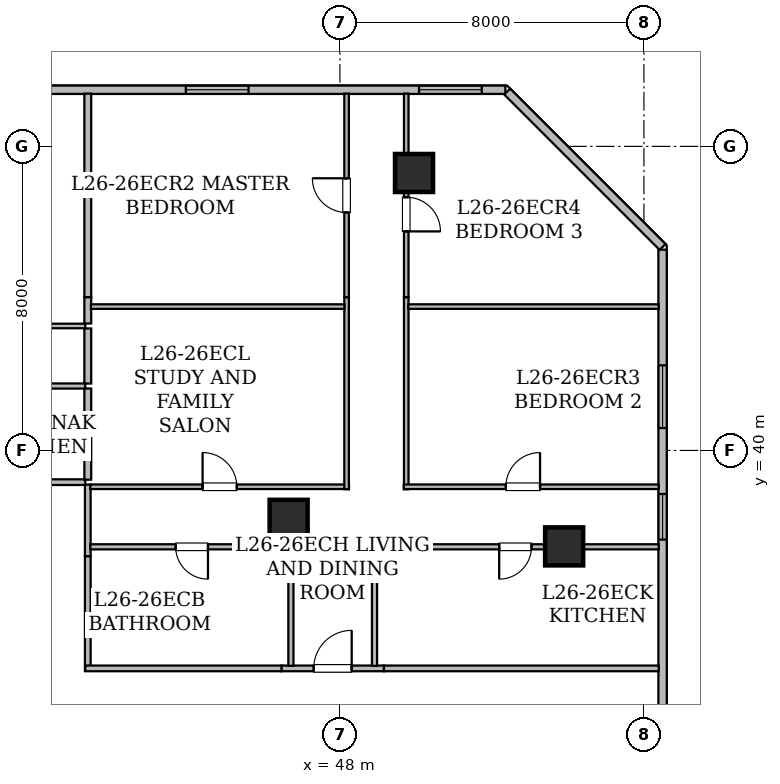
"""IFC4 building model, lengths in metres.
Left out: names, types, materials, properties, quantities, classifications, styles, units other than length and angle.
Written with IfcOpenShell. Run it as: python <this file> out.ifc"""

import sys

from ifc_helpers import new_model, si_unit, direction, frame, frame_2d, origin, origin_2d, place, context, subcontext, project, spatial, rectangle, hollow_rectangle, extrude, element, fill, save


model = new_model("IFC4")
c1 = context("Model", 3, precision=1e-05, world=origin(), true_north=direction((0.0, 1.0)))
c2 = subcontext(c1, "Body", "Model", "MODEL_VIEW")
j1 = project(units=[si_unit("LENGTHUNIT", "METRE"), si_unit("PLANEANGLEUNIT", "RADIAN")], contexts=[c1])
p1 = place(None, origin())
s1 = spatial("IfcSite", under=j1, at=p1, CompositionType="ELEMENT")
p2 = place(p1, origin())
s2 = spatial("IfcBuilding", under=s1, at=p2, CompositionType="ELEMENT")
p3 = place(p2, frame((0.0, 0.0, 105.55)))
s3 = spatial("IfcBuildingStorey", under=s2, at=p3, CompositionType="ELEMENT", Elevation=105.55)
for number, where, z_axis, x_axis in (
    (1, (49.95, 47.3, 0.0), (0.0, 0.0, 1.0), (1.0, 0.0, 0.0)),
    (2, (53.9, 37.475, 0.0), (0.0, 0.0, 1.0), (1.0, 0.0, 0.0)),
    (3, (46.65, 38.2, 0.0), (0.0, 0.0, 1.0), (1.0, 0.0, 0.0)),
):
    element("IfcColumn", number, at=place(p3, frame(where, z_axis=z_axis, x_axis=x_axis)), inside=s3, PredefinedType="COLUMN", context=c2, shape_type="SweptSolid", body=[
        extrude(hollow_rectangle(XDim=1.0, YDim=1.0, WallThickness=0.05, at=origin_2d()), origin(), (0.0, 0.0, 1.0), 3.65),
    ])
p4 = place(p3, frame((13.715, 49.49, 0.0), z_axis=(0.0, 0.0, 1.0), x_axis=(1.0, 0.0, 0.0)))
e4 = element("IfcWall", 4, at=p4, inside=s3, PredefinedType="STANDARD", context=c2, shape_type="SweptSolid", body=[
    extrude(rectangle(XDim=38.639, YDim=0.22, at=frame_2d((19.319, 0.0))), origin(), (0.0, 0.0, 1.0), 3.43),
])
p5 = place(p4, frame((1.435, 0.0, 0.85)))
e5 = element("IfcOpeningElement", 5, at=p5, cuts=e4, PredefinedType="OPENING", context=c2, shape_type="SweptSolid", body=[
    extrude(rectangle(XDim=1.65, YDim=1.55, at=frame_2d((0.825, 0.775))), frame((0.0, 0.12, 0.0), z_axis=(0.0, -1.0, 0.0), x_axis=(1.0, 0.0, 0.0)), (0.0, 0.0, 1.0), 0.24),
])
p6 = place(p4, frame((10.802, 0.0, 0.85)))
e6 = element("IfcOpeningElement", 6, at=p6, cuts=e4, PredefinedType="OPENING", context=c2, shape_type="SweptSolid", body=[
    extrude(rectangle(XDim=1.65, YDim=1.55, at=frame_2d((0.825, 0.775))), frame((0.0, 0.12, 0.0), z_axis=(0.0, -1.0, 0.0), x_axis=(1.0, 0.0, 0.0)), (0.0, 0.0, 1.0), 0.24),
])
p7 = place(p4, frame((8.744, 0.0, 0.8)))
e7 = element("IfcOpeningElement", 7, at=p7, cuts=e4, PredefinedType="OPENING", context=c2, shape_type="SweptSolid", body=[
    extrude(rectangle(XDim=1.2, YDim=1.5, at=frame_2d((0.6, 0.75))), frame((0.0, 0.12, 0.0), z_axis=(0.0, -1.0, 0.0), x_axis=(1.0, 0.0, 0.0)), (0.0, 0.0, 1.0), 0.24),
])
p8 = place(p4, frame((5.319, 0.0, 0.85)))
e8 = element("IfcOpeningElement", 8, at=p8, cuts=e4, PredefinedType="OPENING", context=c2, shape_type="SweptSolid", body=[
    extrude(rectangle(XDim=1.65, YDim=1.55, at=frame_2d((0.825, 0.775))), frame((0.0, 0.12, 0.0), z_axis=(0.0, -1.0, 0.0), x_axis=(1.0, 0.0, 0.0)), (0.0, 0.0, 1.0), 0.24),
])
p9 = place(p4, frame((15.665, 0.0, 0.85)))
e9 = element("IfcOpeningElement", 9, at=p9, cuts=e4, PredefinedType="OPENING", context=c2, shape_type="SweptSolid", body=[
    extrude(rectangle(XDim=1.65, YDim=1.55, at=frame_2d((0.825, 0.775))), frame((0.0, 0.12, 0.0), z_axis=(0.0, -1.0, 0.0), x_axis=(1.0, 0.0, 0.0)), (0.0, 0.0, 1.0), 0.24),
])
p10 = place(p4, frame((22.93, 0.0, 0.85)))
e10 = element("IfcOpeningElement", 10, at=p10, cuts=e4, PredefinedType="OPENING", context=c2, shape_type="SweptSolid", body=[
    extrude(rectangle(XDim=1.65, YDim=1.55, at=frame_2d((0.825, 0.775))), frame((0.0, 0.12, 0.0), z_axis=(0.0, -1.0, 0.0), x_axis=(1.0, 0.0, 0.0)), (0.0, 0.0, 1.0), 0.24),
])
p11 = place(p4, frame((30.23, 0.0, 0.85)))
e11 = element("IfcOpeningElement", 11, at=p11, cuts=e4, PredefinedType="OPENING", context=c2, shape_type="SweptSolid", body=[
    extrude(rectangle(XDim=1.65, YDim=1.55, at=frame_2d((0.825, 0.775))), frame((0.0, 0.12, 0.0), z_axis=(0.0, -1.0, 0.0), x_axis=(1.0, 0.0, 0.0)), (0.0, 0.0, 1.0), 0.24),
])
p12 = place(p4, frame((36.367, 0.0, 0.85)))
e12 = element("IfcOpeningElement", 12, at=p12, cuts=e4, PredefinedType="OPENING", context=c2, shape_type="SweptSolid", body=[
    extrude(rectangle(XDim=1.65, YDim=1.55, at=frame_2d((0.825, 0.775))), frame((0.0, 0.12, 0.0), z_axis=(0.0, -1.0, 0.0), x_axis=(1.0, 0.0, 0.0)), (0.0, 0.0, 1.0), 0.24),
])
p13 = place(p3, frame((52.402, 49.442, 0.0), z_axis=(0.0, 0.0, 1.0), x_axis=(0.707106781187, -0.707106781187, 0.0)))
e13 = element("IfcWall", 13, at=p13, inside=s3, PredefinedType="STANDARD", context=c2, shape_type="SweptSolid", body=[
    extrude(rectangle(XDim=5.781, YDim=0.22, at=frame_2d((2.891, 0.0))), origin(), (0.0, 0.0, 1.0), 3.43),
])
p14 = place(p3, frame((56.49, 45.283, 0.0), z_axis=(0.0, 0.0, 1.0), x_axis=(0.0, -1.0, 0.0)))
e14 = element("IfcWall", 14, at=p14, inside=s3, PredefinedType="STANDARD", context=c2, shape_type="SweptSolid", body=[
    extrude(rectangle(XDim=14.046, YDim=0.22, at=frame_2d((7.023, 0.0))), origin(), (0.0, 0.0, 1.0), 3.43),
])
p15 = place(p14, frame((6.429, 0.0, 0.8)))
e15 = element("IfcOpeningElement", 15, at=p15, cuts=e14, PredefinedType="OPENING", context=c2, shape_type="SweptSolid", body=[
    extrude(rectangle(XDim=1.2, YDim=1.5, at=frame_2d((0.6, 0.75))), frame((0.0, 0.12, 0.0), z_axis=(0.0, -1.0, 0.0), x_axis=(1.0, 0.0, 0.0)), (0.0, 0.0, 1.0), 0.24),
])
p16 = place(p14, frame((3.044, 0.0, 0.85)))
e16 = element("IfcOpeningElement", 16, at=p16, cuts=e14, PredefinedType="OPENING", context=c2, shape_type="SweptSolid", body=[
    extrude(rectangle(XDim=1.65, YDim=1.55, at=frame_2d((0.825, 0.775))), frame((0.0, 0.12, 0.0), z_axis=(0.0, -1.0, 0.0), x_axis=(1.0, 0.0, 0.0)), (0.0, 0.0, 1.0), 0.24),
])
p17 = place(p3, frame((34.299, 39.165, 0.0), z_axis=(0.0, 0.0, 1.0), x_axis=(1.0, 0.0, 0.0)))
e17 = element("IfcWall", 17, at=p17, inside=s3, PredefinedType="STANDARD", context=c2, shape_type="SweptSolid", body=[
    extrude(rectangle(XDim=7.001, YDim=0.15, at=frame_2d((3.5, 0.0))), origin(), (0.0, 0.0, 1.0), 2.647),
])
p18 = place(p3, frame((41.365, 39.1, 0.0), z_axis=(0.0, 0.0, 1.0), x_axis=(0.0, -1.0, 0.0)))
e18 = element("IfcWall", 18, at=p18, inside=s3, PredefinedType="STANDARD", context=c2, shape_type="SweptSolid", body=[
    extrude(rectangle(XDim=1.885, YDim=0.15, at=frame_2d((0.942, 0.0))), origin(), (0.0, 0.0, 1.0), 2.647),
])
p19 = place(p3, frame((46.461, 34.265, 0.0), z_axis=(0.0, 0.0, 1.0), x_axis=(1.0, 0.0, 0.0)))
e19 = element("IfcWall", 19, at=p19, inside=s3, PredefinedType="STANDARD", context=c2, shape_type="SweptSolid", body=[
    extrude(rectangle(XDim=2.698, YDim=0.15, at=frame_2d((1.349, 0.0))), origin(), (0.0, 0.0, 1.0), 2.647),
])
p20 = place(p19, frame((0.849, 0.0, 0.0)))
e20 = element("IfcOpeningElement", 20, at=p20, cuts=e19, PredefinedType="OPENING", context=c2, shape_type="SweptSolid", body=[
    extrude(rectangle(XDim=1.0, YDim=2.15, at=frame_2d((0.5, 1.075))), frame((0.0, 0.085, 0.0), z_axis=(0.0, -1.0, 0.0), x_axis=(1.0, 0.0, 0.0)), (0.0, 0.0, 1.0), 0.17),
])
p21 = place(p3, frame((41.365, 37.215, 0.0), z_axis=(0.0, 0.0, 1.0), x_axis=(0.0, -1.0, 0.0)))
e21 = element("IfcWall", 21, at=p21, inside=s3, PredefinedType="STANDARD", context=c2, shape_type="SweptSolid", body=[
    extrude(rectangle(XDim=3.015, YDim=0.15, at=frame_2d((1.508, 0.0))), origin(), (0.0, 0.0, 1.0), 2.647),
])
p22 = place(p3, frame((41.3, 34.265, 0.0), z_axis=(0.0, 0.0, 1.0), x_axis=(1.0, 0.0, 0.0)))
e22 = element("IfcWall", 22, at=p22, inside=s3, PredefinedType="STANDARD", context=c2, shape_type="SweptSolid", body=[
    extrude(rectangle(XDim=5.161, YDim=0.15, at=frame_2d((2.581, 0.0))), origin(), (0.0, 0.0, 1.0), 2.647),
])
p23 = place(p3, frame((49.159, 34.265, 0.0), z_axis=(0.0, 0.0, 1.0), x_axis=(1.0, 0.0, 0.0)))
e23 = element("IfcWall", 23, at=p23, inside=s3, PredefinedType="STANDARD", context=c2, shape_type="SweptSolid", body=[
    extrude(rectangle(XDim=7.229, YDim=0.15, at=frame_2d((3.615, 0.0))), origin(), (0.0, 0.0, 1.0), 2.876),
])
p24 = place(p3, frame((41.3, 41.695, 0.0), z_axis=(0.0, 0.0, 1.0), x_axis=(-1.0, 0.0, 0.0)))
e24 = element("IfcWall", 24, at=p24, inside=s3, PredefinedType="PARTITIONING", context=c2, shape_type="SweptSolid", body=[
    extrude(rectangle(XDim=7.315, YDim=0.135, at=frame_2d((3.657, 0.0))), origin(), (0.0, 0.0, 1.0), 2.647),
])
p25 = place(p24, frame((3.233, 0.0, 0.0)))
e25 = element("IfcOpeningElement", 25, at=p25, cuts=e24, PredefinedType="OPENING", context=c2, shape_type="SweptSolid", body=[
    extrude(rectangle(XDim=0.85, YDim=2.1, at=frame_2d((0.425, 1.05))), frame((0.0, 0.077, 0.0), z_axis=(0.0, -1.0, 0.0), x_axis=(1.0, 0.0, 0.0)), (0.0, 0.0, 1.0), 0.155),
])
p26 = place(p3, frame((33.823, 43.275, 0.0), z_axis=(0.0, 0.0, 1.0), x_axis=(1.0, 0.0, 0.0)))
e26 = element("IfcWall", 26, at=p26, inside=s3, PredefinedType="PARTITIONING", context=c2, shape_type="SweptSolid", body=[
    extrude(rectangle(XDim=7.477, YDim=0.12, at=frame_2d((3.739, 0.0))), origin(), (0.0, 0.0, 1.0), 2.647),
])
p27 = place(p26, frame((3.288, 0.0, 0.0)))
e27 = element("IfcOpeningElement", 27, at=p27, cuts=e26, PredefinedType="OPENING", context=c2, shape_type="SweptSolid", body=[
    extrude(rectangle(XDim=0.9, YDim=2.1, at=frame_2d((0.45, 1.05))), frame((0.0, 0.07, 0.0), z_axis=(0.0, -1.0, 0.0), x_axis=(1.0, 0.0, 0.0)), (0.0, 0.0, 1.0), 0.14),
])
p28 = place(p3, frame((41.365, 43.21, 0.0), z_axis=(0.0, 0.0, 1.0), x_axis=(0.0, -1.0, 0.0)))
e28 = element("IfcWall", 28, at=p28, inside=s3, PredefinedType="STANDARD", context=c2, shape_type="SweptSolid", body=[
    extrude(rectangle(XDim=1.45, YDim=0.18, at=frame_2d((0.725, 0.0))), origin(), (0.0, 0.0, 1.0), 3.43),
])
p29 = place(p3, frame((41.365, 41.63, 0.0), z_axis=(0.0, 0.0, 1.0), x_axis=(0.0, -1.0, 0.0)))
e29 = element("IfcWall", 29, at=p29, inside=s3, PredefinedType="STANDARD", context=c2, shape_type="SweptSolid", body=[
    extrude(rectangle(XDim=2.4, YDim=0.18, at=frame_2d((1.2, 0.0))), origin(), (0.0, 0.0, 1.0), 3.43),
])
p30 = place(p3, frame((41.365, 44.034, 0.0), z_axis=(0.0, 0.0, 1.0), x_axis=(0.0, -1.0, 0.0)))
e30 = element("IfcWall", 30, at=p30, inside=s3, PredefinedType="STANDARD", context=c2, shape_type="SweptSolid", body=[
    extrude(rectangle(XDim=0.694, YDim=0.18, at=frame_2d((0.347, 0.0))), origin(), (0.0, 0.0, 1.0), 3.43),
])
p31 = place(p3, frame((41.365, 49.388, 0.0), z_axis=(0.0, 0.0, 1.0), x_axis=(0.0, -1.0, 0.0)))
e31 = element("IfcWall", 31, at=p31, inside=s3, PredefinedType="STANDARD", context=c2, shape_type="SweptSolid", body=[
    extrude(rectangle(XDim=5.354, YDim=0.18, at=frame_2d((2.677, 0.0))), origin(), (0.0, 0.0, 1.0), 2.876),
])
p32 = place(p3, frame((46.71, 34.332, 0.0), z_axis=(0.0, 0.0, 1.0), x_axis=(0.0, 1.0, 0.0)))
e32 = element("IfcWall", 32, at=p32, inside=s3, PredefinedType="PARTITIONING", context=c2, shape_type="SweptSolid", body=[
    extrude(rectangle(XDim=3.197, YDim=0.135, at=frame_2d((1.599, 0.0))), origin(), (0.0, 0.0, 1.0), 2.647),
])
p33 = place(p3, frame((46.775, 37.464, 0.0), z_axis=(0.0, 0.0, 1.0), x_axis=(-1.0, 0.0, 0.0)))
e33 = element("IfcWall", 33, at=p33, inside=s3, PredefinedType="PARTITIONING", context=c2, shape_type="SweptSolid", body=[
    extrude(rectangle(XDim=5.343, YDim=0.135, at=frame_2d((2.671, 0.0))), origin(), (0.0, 0.0, 1.0), 2.647),
])
p34 = place(p33, frame((2.247, 0.0, 0.0)))
e34 = element("IfcOpeningElement", 34, at=p34, cuts=e33, PredefinedType="OPENING", context=c2, shape_type="SweptSolid", body=[
    extrude(rectangle(XDim=0.85, YDim=2.1, at=frame_2d((0.425, 1.05))), frame((0.0, 0.077, 0.0), z_axis=(0.0, -1.0, 0.0), x_axis=(1.0, 0.0, 0.0)), (0.0, 0.0, 1.0), 0.155),
])
p35 = place(p3, frame((56.388, 37.464, 0.0), z_axis=(0.0, 0.0, 1.0), x_axis=(-1.0, 0.0, 0.0)))
e35 = element("IfcWall", 35, at=p35, inside=s3, PredefinedType="PARTITIONING", context=c2, shape_type="SweptSolid", body=[
    extrude(rectangle(XDim=7.543, YDim=0.135, at=frame_2d((3.771, 0.0))), origin(), (0.0, 0.0, 1.0), 2.647),
])
p36 = place(p35, frame((3.347, 0.0, 0.0)))
e36 = element("IfcOpeningElement", 36, at=p36, cuts=e35, PredefinedType="OPENING", context=c2, shape_type="SweptSolid", body=[
    extrude(rectangle(XDim=0.85, YDim=2.1, at=frame_2d((0.425, 1.05))), frame((0.0, 0.077, 0.0), z_axis=(0.0, -1.0, 0.0), x_axis=(1.0, 0.0, 0.0)), (0.0, 0.0, 1.0), 0.155),
])
p37 = place(p3, frame((48.91, 37.529, 0.0), z_axis=(0.0, 0.0, 1.0), x_axis=(0.0, -1.0, 0.0)))
e37 = element("IfcWall", 37, at=p37, inside=s3, PredefinedType="PARTITIONING", context=c2, shape_type="SweptSolid", body=[
    extrude(rectangle(XDim=3.197, YDim=0.135, at=frame_2d((1.599, 0.0))), origin(), (0.0, 0.0, 1.0), 3.43),
])
p38 = place(p3, frame((41.432, 39.044, 0.0), z_axis=(0.0, 0.0, 1.0), x_axis=(1.0, 0.0, 0.0)))
e38 = element("IfcWall", 38, at=p38, inside=s3, PredefinedType="PARTITIONING", context=c2, shape_type="SweptSolid", body=[
    extrude(rectangle(XDim=6.808, YDim=0.12, at=frame_2d((3.404, 0.0))), origin(), (0.0, 0.0, 1.0), 2.647),
])
p39 = place(p38, frame((2.954, 0.0, 0.0)))
e39 = element("IfcOpeningElement", 39, at=p39, cuts=e38, PredefinedType="OPENING", context=c2, shape_type="SweptSolid", body=[
    extrude(rectangle(XDim=0.9, YDim=2.1, at=frame_2d((0.45, 1.05))), frame((0.0, 0.07, 0.0), z_axis=(0.0, -1.0, 0.0), x_axis=(1.0, 0.0, 0.0)), (0.0, 0.0, 1.0), 0.14),
])
p40 = place(p3, frame((48.175, 38.979, 0.0), z_axis=(0.0, 0.0, 1.0), x_axis=(0.0, 1.0, 0.0)))
e40 = element("IfcWall", 40, at=p40, inside=s3, PredefinedType="PARTITIONING", context=c2, shape_type="SweptSolid", body=[
    extrude(rectangle(XDim=5.055, YDim=0.12, at=frame_2d((2.527, 0.0))), origin(), (0.0, 0.0, 1.0), 2.647),
])
p41 = place(p3, frame((48.175, 44.034, 0.0), z_axis=(0.0, 0.0, 1.0), x_axis=(0.0, 1.0, 0.0)))
e41 = element("IfcWall", 41, at=p41, inside=s3, PredefinedType="PARTITIONING", context=c2, shape_type="SweptSolid", body=[
    extrude(rectangle(XDim=5.354, YDim=0.12, at=frame_2d((2.677, 0.0))), origin(), (0.0, 0.0, 1.0), 2.876),
])
p42 = place(p41, frame((2.227, 0.0, 0.0)))
e42 = element("IfcOpeningElement", 42, at=p42, cuts=e41, PredefinedType="OPENING", context=c2, shape_type="SweptSolid", body=[
    extrude(rectangle(XDim=0.9, YDim=2.1, at=frame_2d((0.45, 1.05))), frame((0.0, 0.07, 0.0), z_axis=(0.0, -1.0, 0.0), x_axis=(1.0, 0.0, 0.0)), (0.0, 0.0, 1.0), 0.14),
])
p43 = place(p3, frame((49.745, 44.034, 0.0), z_axis=(0.0, 0.0, 1.0), x_axis=(0.0, -1.0, 0.0)))
e43 = element("IfcWall", 43, at=p43, inside=s3, PredefinedType="PARTITIONING", context=c2, shape_type="SweptSolid", body=[
    extrude(rectangle(XDim=5.055, YDim=0.12, at=frame_2d((2.527, 0.0))), origin(), (0.0, 0.0, 1.0), 3.43),
])
p44 = place(p3, frame((49.68, 39.044, 0.0), z_axis=(0.0, 0.0, 1.0), x_axis=(1.0, 0.0, 0.0)))
e44 = element("IfcWall", 44, at=p44, inside=s3, PredefinedType="PARTITIONING", context=c2, shape_type="SweptSolid", body=[
    extrude(rectangle(XDim=6.708, YDim=0.12, at=frame_2d((3.354, 0.0))), origin(), (0.0, 0.0, 1.0), 2.876),
])
p45 = place(p44, frame((2.686, 0.0, 0.0)))
e45 = element("IfcOpeningElement", 45, at=p45, cuts=e44, PredefinedType="OPENING", context=c2, shape_type="SweptSolid", body=[
    extrude(rectangle(XDim=0.9, YDim=2.1, at=frame_2d((0.45, 1.05))), frame((0.0, 0.07, 0.0), z_axis=(0.0, -1.0, 0.0), x_axis=(1.0, 0.0, 0.0)), (0.0, 0.0, 1.0), 0.14),
])
p46 = place(p3, frame((49.745, 49.388, 0.0), z_axis=(0.0, 0.0, 1.0), x_axis=(0.0, -1.0, 0.0)))
e46 = element("IfcWall", 46, at=p46, inside=s3, PredefinedType="PARTITIONING", context=c2, shape_type="SweptSolid", body=[
    extrude(rectangle(XDim=5.354, YDim=0.12, at=frame_2d((2.677, 0.0))), origin(), (0.0, 0.0, 1.0), 2.647),
])
p47 = place(p46, frame((2.725, 0.0, 0.0)))
e47 = element("IfcOpeningElement", 47, at=p47, cuts=e46, PredefinedType="OPENING", context=c2, shape_type="SweptSolid", body=[
    extrude(rectangle(XDim=0.9, YDim=2.1, at=frame_2d((0.45, 1.05))), frame((0.0, 0.07, 0.0), z_axis=(0.0, -1.0, 0.0), x_axis=(1.0, 0.0, 0.0)), (0.0, 0.0, 1.0), 0.14),
])
p48 = place(p3, frame((41.447, 43.785, 0.0), z_axis=(0.0, 0.0, 1.0), x_axis=(1.0, 0.0, 0.0)))
e48 = element("IfcWall", 48, at=p48, inside=s3, PredefinedType="PARTITIONING", context=c2, shape_type="SweptSolid", body=[
    extrude(rectangle(XDim=6.674, YDim=0.12, at=frame_2d((3.337, 0.0))), origin(), (0.0, 0.0, 1.0), 3.43),
])
p49 = place(p3, frame((49.799, 43.785, 0.0), z_axis=(0.0, 0.0, 1.0), x_axis=(1.0, 0.0, 0.0)))
e49 = element("IfcWall", 49, at=p49, inside=s3, PredefinedType="PARTITIONING", context=c2, shape_type="SweptSolid", body=[
    extrude(rectangle(XDim=6.589, YDim=0.12, at=frame_2d((3.294, 0.0))), origin(), (0.0, 0.0, 1.0), 2.876),
])
p50 = place(p15, origin())
e50 = element("IfcWindow", 50, at=p50, inside=s3, PartitioningType="SINGLE_PANEL", PredefinedType="WINDOW", context=c2, shape_type="SweptSolid", body=[
    extrude(rectangle(XDim=1.2, YDim=1.5, at=frame_2d((0.6, 0.75))), frame((0.0, 0.03, 0.0), z_axis=(0.0, -1.0, 0.0), x_axis=(1.0, 0.0, 0.0)), (0.0, 0.0, 1.0), 0.06),
])
fill(e15, e50)
p51 = place(p11, origin())
e51 = element("IfcWindow", 51, at=p51, inside=s3, PartitioningType="SINGLE_PANEL", PredefinedType="WINDOW", context=c2, shape_type="SweptSolid", body=[
    extrude(rectangle(XDim=1.65, YDim=1.55, at=frame_2d((0.825, 0.775))), frame((0.0, 0.03, 0.0), z_axis=(0.0, -1.0, 0.0), x_axis=(1.0, 0.0, 0.0)), (0.0, 0.0, 1.0), 0.06),
])
fill(e11, e51)
p52 = place(p16, origin())
e52 = element("IfcWindow", 52, at=p52, inside=s3, PartitioningType="SINGLE_PANEL", PredefinedType="WINDOW", context=c2, shape_type="SweptSolid", body=[
    extrude(rectangle(XDim=1.65, YDim=1.55, at=frame_2d((0.825, 0.775))), frame((0.0, 0.03, 0.0), z_axis=(0.0, -1.0, 0.0), x_axis=(1.0, 0.0, 0.0)), (0.0, 0.0, 1.0), 0.06),
])
fill(e16, e52)
p53 = place(p12, origin())
e53 = element("IfcWindow", 53, at=p53, inside=s3, PartitioningType="SINGLE_PANEL", PredefinedType="WINDOW", context=c2, shape_type="SweptSolid", body=[
    extrude(rectangle(XDim=1.65, YDim=1.55, at=frame_2d((0.825, 0.775))), frame((0.0, 0.03, 0.0), z_axis=(0.0, -1.0, 0.0), x_axis=(1.0, 0.0, 0.0)), (0.0, 0.0, 1.0), 0.06),
])
fill(e12, e53)
p54 = place(p20, origin())
e54 = element("IfcDoor", 54, at=p54, inside=s3, OperationType="SINGLE_SWING_RIGHT", PredefinedType="DOOR", context=c2, shape_type="SweptSolid", body=[
    extrude(rectangle(XDim=1.0, YDim=2.15, at=frame_2d((0.5, 1.075))), frame((0.0, 0.025, 0.0), z_axis=(0.0, -1.0, 0.0), x_axis=(1.0, 0.0, 0.0)), (0.0, 0.0, 1.0), 0.05),
])
fill(e20, e54)
p55 = place(p34, origin())
e55 = element("IfcDoor", 55, at=p55, inside=s3, OperationType="SINGLE_SWING_LEFT", PredefinedType="DOOR", context=c2, shape_type="SweptSolid", body=[
    extrude(rectangle(XDim=0.85, YDim=2.1, at=frame_2d((0.425, 1.05))), frame((0.0, 0.025, 0.0), z_axis=(0.0, -1.0, 0.0), x_axis=(1.0, 0.0, 0.0)), (0.0, 0.0, 1.0), 0.05),
])
fill(e34, e55)
p56 = place(p36, origin())
e56 = element("IfcDoor", 56, at=p56, inside=s3, OperationType="SINGLE_SWING_RIGHT", PredefinedType="DOOR", context=c2, shape_type="SweptSolid", body=[
    extrude(rectangle(XDim=0.85, YDim=2.1, at=frame_2d((0.425, 1.05))), frame((0.0, 0.025, 0.0), z_axis=(0.0, -1.0, 0.0), x_axis=(1.0, 0.0, 0.0)), (0.0, 0.0, 1.0), 0.05),
])
fill(e36, e56)
p57 = place(p39, origin())
e57 = element("IfcDoor", 57, at=p57, inside=s3, OperationType="SINGLE_SWING_LEFT", PredefinedType="DOOR", context=c2, shape_type="SweptSolid", body=[
    extrude(rectangle(XDim=0.9, YDim=2.1, at=frame_2d((0.45, 1.05))), frame((0.0, 0.025, 0.0), z_axis=(0.0, -1.0, 0.0), x_axis=(1.0, 0.0, 0.0)), (0.0, 0.0, 1.0), 0.05),
])
fill(e39, e57)
p58 = place(p42, origin())
e58 = element("IfcDoor", 58, at=p58, inside=s3, OperationType="SINGLE_SWING_RIGHT", PredefinedType="DOOR", context=c2, shape_type="SweptSolid", body=[
    extrude(rectangle(XDim=0.9, YDim=2.1, at=frame_2d((0.45, 1.05))), frame((0.0, 0.025, 0.0), z_axis=(0.0, -1.0, 0.0), x_axis=(1.0, 0.0, 0.0)), (0.0, 0.0, 1.0), 0.05),
])
fill(e42, e58)
p59 = place(p45, origin())
e59 = element("IfcDoor", 59, at=p59, inside=s3, OperationType="SINGLE_SWING_RIGHT", PredefinedType="DOOR", context=c2, shape_type="SweptSolid", body=[
    extrude(rectangle(XDim=0.9, YDim=2.1, at=frame_2d((0.45, 1.05))), frame((0.0, 0.025, 0.0), z_axis=(0.0, -1.0, 0.0), x_axis=(1.0, 0.0, 0.0)), (0.0, 0.0, 1.0), 0.05),
])
fill(e45, e59)
p60 = place(p47, origin())
e60 = element("IfcDoor", 60, at=p60, inside=s3, OperationType="SINGLE_SWING_RIGHT", PredefinedType="DOOR", context=c2, shape_type="SweptSolid", body=[
    extrude(rectangle(XDim=0.9, YDim=2.1, at=frame_2d((0.45, 1.05))), frame((0.0, 0.025, 0.0), z_axis=(0.0, -1.0, 0.0), x_axis=(1.0, 0.0, 0.0)), (0.0, 0.0, 1.0), 0.05),
])
fill(e47, e60)
save(model, sys.argv[1])
